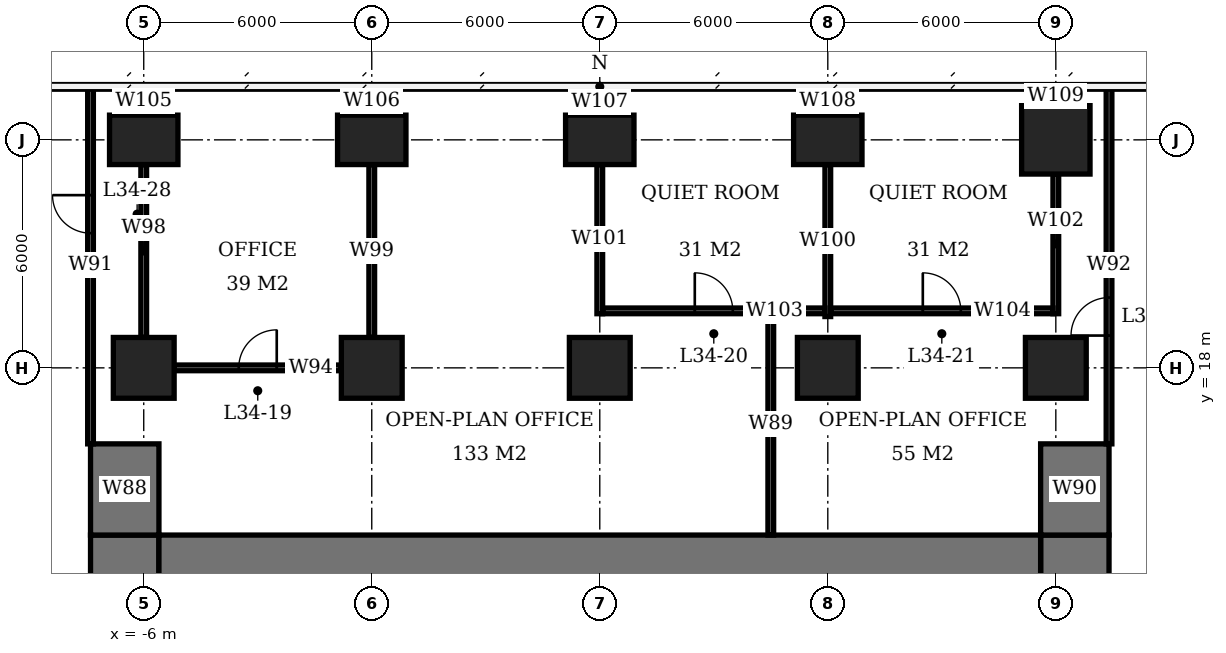
"""IFC4 building model, lengths in metres.
Left out: names, types, materials, properties, quantities, classifications, styles, units other than length and angle.
Written with IfcOpenShell. Run it as: python <this file> out.ifc"""

import sys

from ifc_helpers import new_model, si_unit, direction, frame, frame_2d, origin, origin_2d, place, context, subcontext, project, spatial, rectangle, extrude, element, fill, save


model = new_model("IFC4")
c1 = context("Model", 3, precision=1e-05, world=origin(), true_north=direction((0.0, 1.0)))
c2 = subcontext(c1, "Body", "Model", "MODEL_VIEW")
j1 = project(units=[si_unit("LENGTHUNIT", "METRE"), si_unit("PLANEANGLEUNIT", "RADIAN")], contexts=[c1])
p1 = place(None, origin())
s1 = spatial("IfcSite", under=j1, at=p1, CompositionType="ELEMENT")
p2 = place(p1, origin())
s2 = spatial("IfcBuilding", under=s1, at=p2, CompositionType="ELEMENT")
p3 = place(p2, frame((0.0, 0.0, 140.6)))
s3 = spatial("IfcBuildingStorey", under=s2, at=p3, CompositionType="ELEMENT", Elevation=140.6)
p4 = place(p3, frame((-6.0, 18.0, 0.0), z_axis=(0.0, 0.0, 1.0), x_axis=(1.0, 0.0, 0.0)))
e1 = element("IfcColumn", 1, at=p4, inside=s3, PredefinedType="COLUMN", context=c2, shape_type="SweptSolid", body=[
    extrude(rectangle(XDim=1.6, YDim=1.6, at=origin_2d()), origin(), (0.0, 0.0, 1.0), 3.9),
])
p5 = place(p3, frame((-6.0, 24.0, 0.0), z_axis=(0.0, 0.0, 1.0), x_axis=(1.0, 0.0, 0.0)))
e2 = element("IfcColumn", 2, at=p5, inside=s3, PredefinedType="COLUMN", context=c2, shape_type="SweptSolid", body=[
    extrude(rectangle(XDim=1.8, YDim=1.3, at=origin_2d()), origin(), (0.0, 0.0, 1.0), 3.9),
])
p6 = place(p3, frame((0.0, 18.0, 0.0), z_axis=(0.0, 0.0, 1.0), x_axis=(1.0, 0.0, 0.0)))
e3 = element("IfcColumn", 3, at=p6, inside=s3, PredefinedType="COLUMN", context=c2, shape_type="SweptSolid", body=[
    extrude(rectangle(XDim=1.6, YDim=1.6, at=origin_2d()), origin(), (0.0, 0.0, 1.0), 3.9),
])
p7 = place(p3, frame((0.0, 24.0, 0.0), z_axis=(0.0, 0.0, 1.0), x_axis=(1.0, 0.0, 0.0)))
e4 = element("IfcColumn", 4, at=p7, inside=s3, PredefinedType="COLUMN", context=c2, shape_type="SweptSolid", body=[
    extrude(rectangle(XDim=1.8, YDim=1.3, at=origin_2d()), origin(), (0.0, 0.0, 1.0), 3.9),
])
p8 = place(p3, frame((6.0, 18.0, 0.0), z_axis=(0.0, 0.0, 1.0), x_axis=(1.0, 0.0, 0.0)))
e5 = element("IfcColumn", 5, at=p8, inside=s3, PredefinedType="COLUMN", context=c2, shape_type="SweptSolid", body=[
    extrude(rectangle(XDim=1.6, YDim=1.6, at=origin_2d()), origin(), (0.0, 0.0, 1.0), 3.9),
])
p9 = place(p3, frame((6.0, 24.0, 0.0), z_axis=(0.0, 0.0, 1.0), x_axis=(1.0, 0.0, 0.0)))
e6 = element("IfcColumn", 6, at=p9, inside=s3, PredefinedType="COLUMN", context=c2, shape_type="SweptSolid", body=[
    extrude(rectangle(XDim=1.8, YDim=1.3, at=origin_2d()), origin(), (0.0, 0.0, 1.0), 3.9),
])
p10 = place(p3, frame((12.0, 18.0, 0.0), z_axis=(0.0, 0.0, 1.0), x_axis=(1.0, 0.0, 0.0)))
e7 = element("IfcColumn", 7, at=p10, inside=s3, PredefinedType="COLUMN", context=c2, shape_type="SweptSolid", body=[
    extrude(rectangle(XDim=1.6, YDim=1.6, at=origin_2d()), origin(), (0.0, 0.0, 1.0), 3.9),
])
p11 = place(p3, frame((12.0, 24.0, 0.0), z_axis=(0.0, 0.0, 1.0), x_axis=(1.0, 0.0, 0.0)))
e8 = element("IfcColumn", 8, at=p11, inside=s3, PredefinedType="COLUMN", context=c2, shape_type="SweptSolid", body=[
    extrude(rectangle(XDim=1.8, YDim=1.3, at=origin_2d()), origin(), (0.0, 0.0, 1.0), 3.9),
])
p12 = place(p3, frame((18.0, 18.0, 0.0), z_axis=(0.0, 0.0, 1.0), x_axis=(1.0, 0.0, 0.0)))
e9 = element("IfcColumn", 9, at=p12, inside=s3, PredefinedType="COLUMN", context=c2, shape_type="SweptSolid", body=[
    extrude(rectangle(XDim=1.6, YDim=1.6, at=origin_2d()), origin(), (0.0, 0.0, 1.0), 3.9),
])
p13 = place(p3, frame((18.0, 24.0, 0.0), z_axis=(0.0, 0.0, 1.0), x_axis=(1.0, 0.0, 0.0)))
e10 = element("IfcColumn", 10, at=p13, inside=s3, PredefinedType="COLUMN", context=c2, shape_type="SweptSolid", body=[
    extrude(rectangle(XDim=1.8, YDim=1.8, at=origin_2d()), origin(), (0.0, 0.0, 1.0), 3.9),
])
p14 = place(p3, frame((-5.6, 12.6, 0.0), z_axis=(0.0, 0.0, 1.0), x_axis=(1.0, 0.0, 0.0)))
e11 = element("IfcWall", 11, at=p14, inside=s3, PredefinedType="SHEAR", context=c2, shape_type="SweptSolid", body=[
    extrude(rectangle(XDim=23.2, YDim=2.0, at=frame_2d((11.6, 0.0))), origin(), (0.0, 0.0, 1.0), 3.9),
])
p15 = place(p3, frame((-6.5, -7.6, 0.0), z_axis=(0.0, 0.0, 1.0), x_axis=(0.0, 1.0, 0.0)))
e12 = element("IfcWall", 12, at=p15, inside=s3, PredefinedType="SHEAR", context=c2, shape_type="SweptSolid", body=[
    extrude(rectangle(XDim=21.2, YDim=1.8, at=frame_2d((10.6, 0.0))), origin(), (0.0, 0.0, 1.0), 3.9),
])
p16 = place(p15, frame((7.8, 0.0, 0.0)))
e13 = element("IfcOpeningElement", 13, at=p16, cuts=e12, PredefinedType="OPENING", context=c2, shape_type="SweptSolid", body=[
    extrude(rectangle(XDim=1.8, YDim=2.4, at=frame_2d((0.9, 1.2))), frame((0.0, 0.91, 0.0), z_axis=(0.0, -1.0, 0.0), x_axis=(1.0, 0.0, 0.0)), (0.0, 0.0, 1.0), 1.82),
])
p17 = place(p3, frame((18.5, -7.6, 0.0), z_axis=(0.0, 0.0, 1.0), x_axis=(0.0, 1.0, 0.0)))
e14 = element("IfcWall", 14, at=p17, inside=s3, PredefinedType="SHEAR", context=c2, shape_type="SweptSolid", body=[
    extrude(rectangle(XDim=21.2, YDim=1.8, at=frame_2d((10.6, 0.0))), origin(), (0.0, 0.0, 1.0), 3.9),
])
p18 = place(p17, frame((9.2, 0.0, 0.0)))
e15 = element("IfcOpeningElement", 15, at=p18, cuts=e14, PredefinedType="OPENING", context=c2, shape_type="SweptSolid", body=[
    extrude(rectangle(XDim=1.8, YDim=2.4, at=frame_2d((0.9, 1.2))), frame((0.0, 0.91, 0.0), z_axis=(0.0, -1.0, 0.0), x_axis=(1.0, 0.0, 0.0)), (0.0, 0.0, 1.0), 1.82),
])
for number, where, z_axis, x_axis in (
    (16, (-6.5, 13.6, 0.0), (0.0, 0.0, 1.0), (0.0, 1.0, 0.0)),
    (17, (18.5, 13.6, 0.0), (0.0, 0.0, 1.0), (0.0, 1.0, 0.0)),
):
    element("IfcWall", number, at=place(p3, frame(where, z_axis=z_axis, x_axis=x_axis)), inside=s3, PredefinedType="SHEAR", context=c2, shape_type="SweptSolid", body=[
        extrude(rectangle(XDim=2.4, YDim=1.8, at=frame_2d((1.2, 0.0))), origin(), (0.0, 0.0, 1.0), 3.9),
    ])
p19 = place(p3, frame((-5.2, 18.0, 0.0), z_axis=(0.0, 0.0, 1.0), x_axis=(1.0, 0.0, 0.0)))
e18 = element("IfcWall", 18, at=p19, inside=s3, PredefinedType="PARTITIONING", context=c2, shape_type="SweptSolid", body=[
    extrude(rectangle(XDim=4.4, YDim=0.15, at=frame_2d((2.2, 0.0))), origin(), (0.0, 0.0, 1.0), 3.65),
])
p20 = place(p19, frame((1.7, 0.0, 0.0)))
e19 = element("IfcOpeningElement", 19, at=p20, cuts=e18, PredefinedType="OPENING", context=c2, shape_type="SweptSolid", body=[
    extrude(rectangle(XDim=1.0, YDim=2.1, at=frame_2d((0.5, 1.05))), frame((0.0, 0.085, 0.0), z_axis=(0.0, -1.0, 0.0), x_axis=(1.0, 0.0, 0.0)), (0.0, 0.0, 1.0), 0.17),
])
p21 = place(p3, frame((6.075, 19.5, 0.0), z_axis=(0.0, 0.0, 1.0), x_axis=(1.0, 0.0, 0.0)))
e20 = element("IfcWall", 20, at=p21, inside=s3, PredefinedType="PARTITIONING", context=c2, shape_type="SweptSolid", body=[
    extrude(rectangle(XDim=5.85, YDim=0.15, at=frame_2d((2.925, 0.0))), origin(), (0.0, 0.0, 1.0), 3.65),
])
p22 = place(p21, frame((2.425, 0.0, 0.0)))
e21 = element("IfcOpeningElement", 21, at=p22, cuts=e20, PredefinedType="OPENING", context=c2, shape_type="SweptSolid", body=[
    extrude(rectangle(XDim=1.0, YDim=2.1, at=frame_2d((0.5, 1.05))), frame((0.0, 0.085, 0.0), z_axis=(0.0, -1.0, 0.0), x_axis=(1.0, 0.0, 0.0)), (0.0, 0.0, 1.0), 0.17),
])
p23 = place(p3, frame((12.075, 19.5, 0.0), z_axis=(0.0, 0.0, 1.0), x_axis=(1.0, 0.0, 0.0)))
e22 = element("IfcWall", 22, at=p23, inside=s3, PredefinedType="PARTITIONING", context=c2, shape_type="SweptSolid", body=[
    extrude(rectangle(XDim=5.85, YDim=0.15, at=frame_2d((2.925, 0.0))), origin(), (0.0, 0.0, 1.0), 3.65),
])
p24 = place(p23, frame((2.425, 0.0, 0.0)))
e23 = element("IfcOpeningElement", 23, at=p24, cuts=e22, PredefinedType="OPENING", context=c2, shape_type="SweptSolid", body=[
    extrude(rectangle(XDim=1.0, YDim=2.1, at=frame_2d((0.5, 1.05))), frame((0.0, 0.085, 0.0), z_axis=(0.0, -1.0, 0.0), x_axis=(1.0, 0.0, 0.0)), (0.0, 0.0, 1.0), 0.17),
])
p25 = place(p3, frame((-6.0, 18.8, 0.0), z_axis=(0.0, 0.0, 1.0), x_axis=(0.0, 1.0, 0.0)))
e24 = element("IfcWall", 24, at=p25, inside=s3, PredefinedType="PARTITIONING", context=c2, shape_type="SweptSolid", body=[
    extrude(rectangle(XDim=4.55, YDim=0.15, at=frame_2d((2.275, 0.0))), origin(), (0.0, 0.0, 1.0), 3.65),
])
p26 = place(p3, frame((-6.0, 24.65, 0.0), z_axis=(0.0, 0.0, 1.0), x_axis=(0.0, 1.0, 0.0)))
e25 = element("IfcWall", 25, at=p26, inside=s3, PredefinedType="PARTITIONING", context=c2, shape_type="SweptSolid", body=[
    extrude(rectangle(XDim=0.75, YDim=0.15, at=frame_2d((0.375, 0.0))), origin(), (0.0, 0.0, 1.0), 3.65),
])
p27 = place(p3, frame((0.0, 18.8, 0.0), z_axis=(0.0, 0.0, 1.0), x_axis=(0.0, 1.0, 0.0)))
e26 = element("IfcWall", 26, at=p27, inside=s3, PredefinedType="PARTITIONING", context=c2, shape_type="SweptSolid", body=[
    extrude(rectangle(XDim=4.55, YDim=0.15, at=frame_2d((2.275, 0.0))), origin(), (0.0, 0.0, 1.0), 3.65),
])
p28 = place(p3, frame((0.0, 24.65, 0.0), z_axis=(0.0, 0.0, 1.0), x_axis=(0.0, 1.0, 0.0)))
e27 = element("IfcWall", 27, at=p28, inside=s3, PredefinedType="PARTITIONING", context=c2, shape_type="SweptSolid", body=[
    extrude(rectangle(XDim=0.75, YDim=0.15, at=frame_2d((0.375, 0.0))), origin(), (0.0, 0.0, 1.0), 3.65),
])
p29 = place(p3, frame((6.0, 19.425, 0.0), z_axis=(0.0, 0.0, 1.0), x_axis=(0.0, 1.0, 0.0)))
e28 = element("IfcWall", 28, at=p29, inside=s3, PredefinedType="PARTITIONING", context=c2, shape_type="SweptSolid", body=[
    extrude(rectangle(XDim=3.925, YDim=0.15, at=frame_2d((1.962, 0.0))), origin(), (0.0, 0.0, 1.0), 3.65),
])
p30 = place(p3, frame((6.0, 24.65, 0.0), z_axis=(0.0, 0.0, 1.0), x_axis=(0.0, 1.0, 0.0)))
e29 = element("IfcWall", 29, at=p30, inside=s3, PredefinedType="PARTITIONING", context=c2, shape_type="SweptSolid", body=[
    extrude(rectangle(XDim=0.7, YDim=0.15, at=frame_2d((0.35, 0.0))), origin(), (0.0, 0.0, 1.0), 3.65),
])
p31 = place(p3, frame((12.0, 19.35, 0.0), z_axis=(0.0, 0.0, 1.0), x_axis=(0.0, 1.0, 0.0)))
e30 = element("IfcWall", 30, at=p31, inside=s3, PredefinedType="PARTITIONING", context=c2, shape_type="SweptSolid", body=[
    extrude(rectangle(XDim=4.0, YDim=0.15, at=frame_2d((2.0, 0.0))), origin(), (0.0, 0.0, 1.0), 3.65),
])
p32 = place(p3, frame((12.0, 24.65, 0.0), z_axis=(0.0, 0.0, 1.0), x_axis=(0.0, 1.0, 0.0)))
e31 = element("IfcWall", 31, at=p32, inside=s3, PredefinedType="PARTITIONING", context=c2, shape_type="SweptSolid", body=[
    extrude(rectangle(XDim=0.75, YDim=0.15, at=frame_2d((0.375, 0.0))), origin(), (0.0, 0.0, 1.0), 3.65),
])
p33 = place(p3, frame((18.0, 19.425, 0.0), z_axis=(0.0, 0.0, 1.0), x_axis=(0.0, 1.0, 0.0)))
e32 = element("IfcWall", 32, at=p33, inside=s3, PredefinedType="PARTITIONING", context=c2, shape_type="SweptSolid", body=[
    extrude(rectangle(XDim=3.675, YDim=0.15, at=frame_2d((1.837, 0.0))), origin(), (0.0, 0.0, 1.0), 3.65),
])
p34 = place(p3, frame((18.0, 24.9, 0.0), z_axis=(0.0, 0.0, 1.0), x_axis=(0.0, 1.0, 0.0)))
e33 = element("IfcWall", 33, at=p34, inside=s3, PredefinedType="PARTITIONING", context=c2, shape_type="SweptSolid", body=[
    extrude(rectangle(XDim=0.5, YDim=0.15, at=frame_2d((0.25, 0.0))), origin(), (0.0, 0.0, 1.0), 3.65),
])
p35 = place(p3, frame((-7.4, 16.0, 0.0), z_axis=(0.0, 0.0, 1.0), x_axis=(0.0, 1.0, 0.0)))
e34 = element("IfcWall", 34, at=p35, inside=s3, PredefinedType="PARTITIONING", context=c2, shape_type="SweptSolid", body=[
    extrude(rectangle(XDim=9.4, YDim=0.15, at=frame_2d((4.7, 0.0))), origin(), (0.0, 0.0, 1.0), 3.65),
])
p36 = place(p35, frame((5.545, 0.0, 0.0)))
e35 = element("IfcOpeningElement", 35, at=p36, cuts=e34, PredefinedType="OPENING", context=c2, shape_type="SweptSolid", body=[
    extrude(rectangle(XDim=1.0, YDim=2.1, at=frame_2d((0.5, 1.05))), frame((0.0, 0.085, 0.0), z_axis=(0.0, -1.0, 0.0), x_axis=(1.0, 0.0, 0.0)), (0.0, 0.0, 1.0), 0.17),
])
p37 = place(p3, frame((10.5, 13.6, 0.0), z_axis=(0.0, 0.0, 1.0), x_axis=(0.0, 1.0, 0.0)))
e36 = element("IfcWall", 36, at=p37, inside=s3, PredefinedType="PARTITIONING", context=c2, shape_type="SweptSolid", body=[
    extrude(rectangle(XDim=5.825, YDim=0.15, at=frame_2d((2.913, 0.0))), origin(), (0.0, 0.0, 1.0), 3.65),
])
p38 = place(p3, frame((19.4, 16.0, 0.0), z_axis=(0.0, 0.0, 1.0), x_axis=(0.0, 1.0, 0.0)))
e37 = element("IfcWall", 37, at=p38, inside=s3, PredefinedType="PARTITIONING", context=c2, shape_type="SweptSolid", body=[
    extrude(rectangle(XDim=9.4, YDim=0.15, at=frame_2d((4.7, 0.0))), origin(), (0.0, 0.0, 1.0), 3.65),
])
p39 = place(p38, frame((2.85, 0.0, 0.0)))
e38 = element("IfcOpeningElement", 38, at=p39, cuts=e37, PredefinedType="OPENING", context=c2, shape_type="SweptSolid", body=[
    extrude(rectangle(XDim=1.0, YDim=2.1, at=frame_2d((0.5, 1.05))), frame((0.0, 0.085, 0.0), z_axis=(0.0, -1.0, 0.0), x_axis=(1.0, 0.0, 0.0)), (0.0, 0.0, 1.0), 0.17),
])
p40 = place(p20, origin())
e39 = element("IfcDoor", 39, at=p40, inside=s3, OperationType="SINGLE_SWING_RIGHT", PredefinedType="DOOR", context=c2, shape_type="SweptSolid", body=[
    extrude(rectangle(XDim=1.0, YDim=2.1, at=frame_2d((0.5, 1.05))), frame((0.0, 0.025, 0.0), z_axis=(0.0, -1.0, 0.0), x_axis=(1.0, 0.0, 0.0)), (0.0, 0.0, 1.0), 0.05),
])
fill(e19, e39)
p41 = place(p22, origin())
e40 = element("IfcDoor", 40, at=p41, inside=s3, OperationType="SINGLE_SWING_LEFT", PredefinedType="DOOR", context=c2, shape_type="SweptSolid", body=[
    extrude(rectangle(XDim=1.0, YDim=2.1, at=frame_2d((0.5, 1.05))), frame((0.0, 0.025, 0.0), z_axis=(0.0, -1.0, 0.0), x_axis=(1.0, 0.0, 0.0)), (0.0, 0.0, 1.0), 0.05),
])
fill(e21, e40)
p42 = place(p24, origin())
e41 = element("IfcDoor", 41, at=p42, inside=s3, OperationType="SINGLE_SWING_LEFT", PredefinedType="DOOR", context=c2, shape_type="SweptSolid", body=[
    extrude(rectangle(XDim=1.0, YDim=2.1, at=frame_2d((0.5, 1.05))), frame((0.0, 0.025, 0.0), z_axis=(0.0, -1.0, 0.0), x_axis=(1.0, 0.0, 0.0)), (0.0, 0.0, 1.0), 0.05),
])
fill(e23, e41)
p43 = place(p39, origin())
e42 = element("IfcDoor", 42, at=p43, inside=s3, OperationType="SINGLE_SWING_LEFT", PredefinedType="DOOR", context=c2, shape_type="SweptSolid", body=[
    extrude(rectangle(XDim=1.0, YDim=2.1, at=frame_2d((0.5, 1.05))), frame((0.0, 0.025, 0.0), z_axis=(0.0, -1.0, 0.0), x_axis=(1.0, 0.0, 0.0)), (0.0, 0.0, 1.0), 0.05),
])
fill(e38, e42)
p44 = place(p36, origin())
e43 = element("IfcDoor", 43, at=p44, inside=s3, OperationType="SINGLE_SWING_RIGHT", PredefinedType="DOOR", context=c2, shape_type="SweptSolid", body=[
    extrude(rectangle(XDim=1.0, YDim=2.1, at=frame_2d((0.5, 1.05))), frame((0.0, 0.025, 0.0), z_axis=(0.0, -1.0, 0.0), x_axis=(1.0, 0.0, 0.0)), (0.0, 0.0, 1.0), 0.05),
])
fill(e35, e43)
save(model, sys.argv[1])
